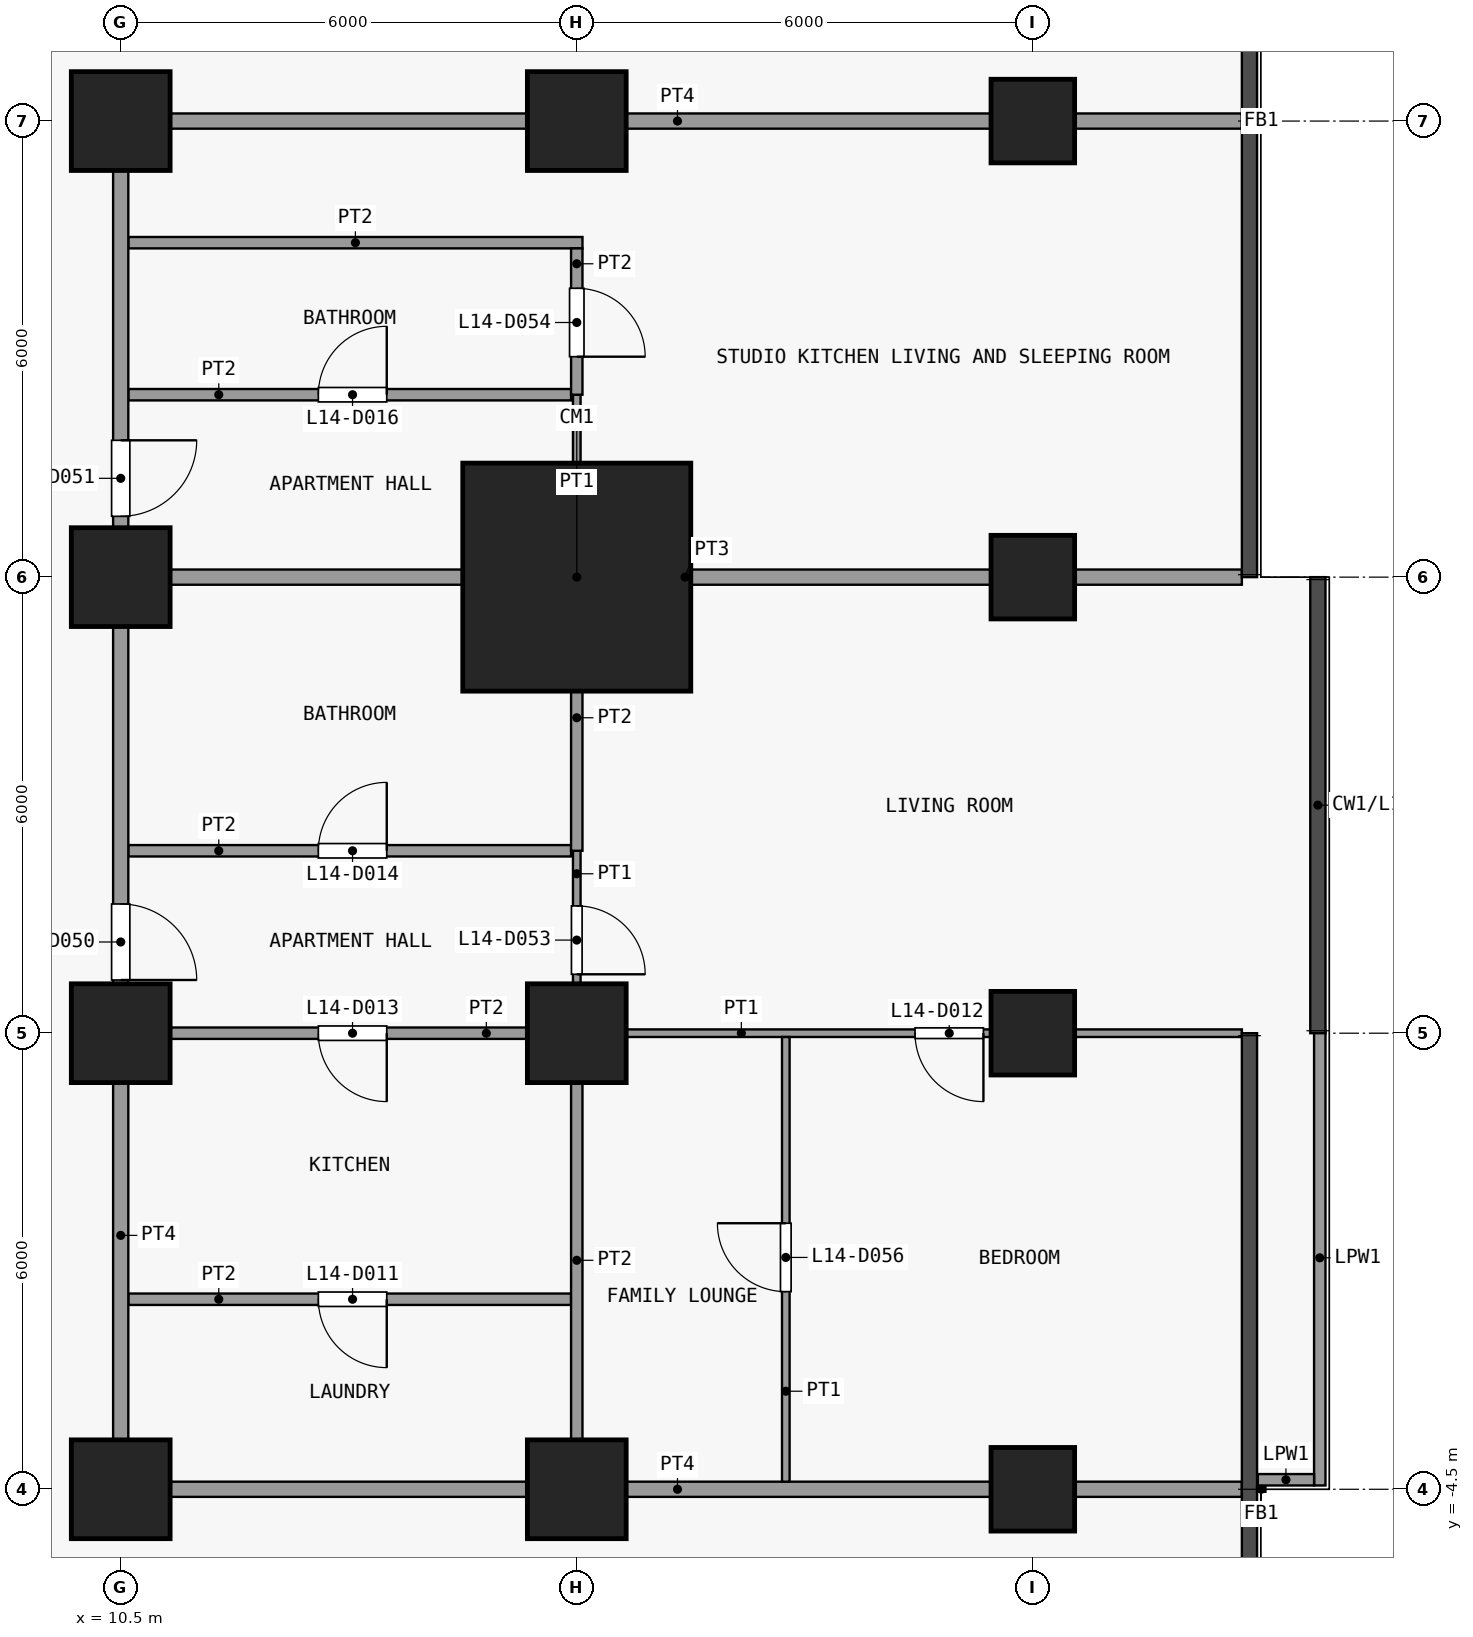
"""IFC4 building model, lengths in metres.
Left out: names, types, materials, properties, quantities, classifications, styles, units other than length and angle.
Written with IfcOpenShell. Run it as: python <this file> out.ifc"""

import sys

from ifc_helpers import new_model, si_unit, direction, frame, frame_2d, origin, origin_2d, place, context, subcontext, project, spatial, rectangle, extrude, element, fill, save


model = new_model("IFC4")
c1 = context("Model", 3, precision=1e-05, world=origin(), true_north=direction((0.0, 1.0)))
c2 = subcontext(c1, "Body", "Model", "MODEL_VIEW")
j1 = project(units=[si_unit("LENGTHUNIT", "METRE"), si_unit("PLANEANGLEUNIT", "RADIAN")], contexts=[c1])
p1 = place(None, origin())
s1 = spatial("IfcSite", under=j1, at=p1, CompositionType="ELEMENT")
p2 = place(p1, origin())
s2 = spatial("IfcBuilding", under=s1, at=p2, CompositionType="ELEMENT")
p3 = place(p2, frame((0.0, 0.0, 61.3)))
s3 = spatial("IfcBuildingStorey", under=s2, at=p3, CompositionType="ELEMENT", Elevation=61.3)
for number, where, z_axis, x_axis in (
    (1, (10.5, -4.5, 0.0), (0.0, 0.0, 1.0), (1.0, 0.0, 0.0)),
    (2, (10.5, 1.5, 0.0), (0.0, 0.0, 1.0), (1.0, 0.0, 0.0)),
    (3, (10.5, 7.5, 0.0), (0.0, 0.0, 1.0), (1.0, 0.0, 0.0)),
    (4, (10.5, 13.5, 0.0), (0.0, 0.0, 1.0), (1.0, 0.0, 0.0)),
    (5, (16.5, -4.5, 0.0), (0.0, 0.0, 1.0), (1.0, 0.0, 0.0)),
    (6, (16.5, 1.5, 0.0), (0.0, 0.0, 1.0), (1.0, 0.0, 0.0)),
):
    element("IfcColumn", number, at=place(p3, frame(where, z_axis=z_axis, x_axis=x_axis)), inside=s3, PredefinedType="COLUMN", context=c2, shape_type="SweptSolid", body=[
        extrude(rectangle(XDim=1.3, YDim=1.3, at=origin_2d()), origin(), (0.0, 0.0, 1.0), 3.6),
    ])
p4 = place(p3, frame((16.5, 7.5, 0.0), z_axis=(0.0, 0.0, 1.0), x_axis=(1.0, 0.0, 0.0)))
e7 = element("IfcColumn", 7, at=p4, inside=s3, PredefinedType="COLUMN", context=c2, shape_type="SweptSolid", body=[
    extrude(rectangle(XDim=3.0, YDim=3.0, at=origin_2d()), origin(), (0.0, 0.0, 1.0), 3.6),
])
p5 = place(p3, frame((16.5, 13.5, 0.0), z_axis=(0.0, 0.0, 1.0), x_axis=(1.0, 0.0, 0.0)))
e8 = element("IfcColumn", 8, at=p5, inside=s3, PredefinedType="COLUMN", context=c2, shape_type="SweptSolid", body=[
    extrude(rectangle(XDim=1.3, YDim=1.3, at=origin_2d()), origin(), (0.0, 0.0, 1.0), 3.6),
])
for number, where, z_axis, x_axis in (
    (9, (22.5, -4.5, 0.0), (0.0, 0.0, 1.0), (1.0, 0.0, 0.0)),
    (10, (22.5, 1.5, 0.0), (0.0, 0.0, 1.0), (1.0, 0.0, 0.0)),
    (11, (22.5, 7.5, 0.0), (0.0, 0.0, 1.0), (1.0, 0.0, 0.0)),
    (12, (22.5, 13.5, 0.0), (0.0, 0.0, 1.0), (1.0, 0.0, 0.0)),
):
    element("IfcColumn", number, at=place(p3, frame(where, z_axis=z_axis, x_axis=x_axis)), inside=s3, PredefinedType="COLUMN", context=c2, shape_type="SweptSolid", body=[
        extrude(rectangle(XDim=1.1, YDim=1.1, at=origin_2d()), origin(), (0.0, 0.0, 1.0), 3.6),
    ])
p6 = place(p3, frame((26.275, 1.54, 0.0), z_axis=(0.0, 0.0, 1.0), x_axis=(0.0, -1.0, 0.0)))
e13 = element("IfcWall", 13, at=p6, inside=s3, PredefinedType="PARAPET", context=c2, shape_type="SweptSolid", body=[
    extrude(rectangle(XDim=5.99, YDim=0.15, at=frame_2d((2.995, 0.0))), origin(), (0.0, 0.0, 1.0), 1.15),
])
p7 = place(p3, frame((26.2, -4.375, 0.0), z_axis=(0.0, 0.0, 1.0), x_axis=(-1.0, 0.0, 0.0)))
e14 = element("IfcWall", 14, at=p7, inside=s3, PredefinedType="PARAPET", context=c2, shape_type="SweptSolid", body=[
    extrude(rectangle(XDim=0.74, YDim=0.15, at=frame_2d((0.37, 0.0))), origin(), (0.0, 0.0, 1.0), 1.15),
])
p8 = place(p3, frame((10.4, -4.5, 0.0), z_axis=(0.0, 0.0, 1.0), x_axis=(1.0, 0.0, 0.0)))
e15 = element("IfcWall", 15, at=p8, inside=s3, PredefinedType="PARTITIONING", context=c2, shape_type="SweptSolid", body=[
    extrude(rectangle(XDim=14.85, YDim=0.2, at=frame_2d((7.425, 0.0))), origin(), (0.0, 0.0, 1.0), 3.3),
])
p9 = place(p3, frame((10.6, -2.0, 0.0), z_axis=(0.0, 0.0, 1.0), x_axis=(1.0, 0.0, 0.0)))
e16 = element("IfcWall", 16, at=p9, inside=s3, PredefinedType="PARTITIONING", context=c2, shape_type="SweptSolid", body=[
    extrude(rectangle(XDim=5.825, YDim=0.15, at=frame_2d((2.913, 0.0))), origin(), (0.0, 0.0, 1.0), 3.3),
])
p10 = place(p9, frame((2.5, 0.0, 0.0)))
e17 = element("IfcOpeningElement", 17, at=p10, cuts=e16, PredefinedType="OPENING", context=c2, shape_type="SweptSolid", body=[
    extrude(rectangle(XDim=0.9, YDim=2.1, at=frame_2d((0.45, 1.05))), frame((0.0, 0.085, 0.0), z_axis=(0.0, -1.0, 0.0), x_axis=(1.0, 0.0, 0.0)), (0.0, 0.0, 1.0), 0.17),
])
p11 = place(p3, frame((16.5, 1.5, 0.0), z_axis=(0.0, 0.0, 1.0), x_axis=(1.0, 0.0, 0.0)))
e18 = element("IfcWall", 18, at=p11, inside=s3, PredefinedType="PARTITIONING", context=c2, shape_type="SweptSolid", body=[
    extrude(rectangle(XDim=8.75, YDim=0.1, at=frame_2d((4.375, 0.0))), origin(), (0.0, 0.0, 1.0), 3.3),
])
p12 = place(p11, frame((4.45, 0.0, 0.0)))
e19 = element("IfcOpeningElement", 19, at=p12, cuts=e18, PredefinedType="OPENING", context=c2, shape_type="SweptSolid", body=[
    extrude(rectangle(XDim=0.9, YDim=2.1, at=frame_2d((0.45, 1.05))), frame((0.0, 0.06, 0.0), z_axis=(0.0, -1.0, 0.0), x_axis=(1.0, 0.0, 0.0)), (0.0, 0.0, 1.0), 0.12),
])
p13 = place(p3, frame((10.6, 1.5, 0.0), z_axis=(0.0, 0.0, 1.0), x_axis=(1.0, 0.0, 0.0)))
e20 = element("IfcWall", 20, at=p13, inside=s3, PredefinedType="PARTITIONING", context=c2, shape_type="SweptSolid", body=[
    extrude(rectangle(XDim=5.9, YDim=0.15, at=frame_2d((2.95, 0.0))), origin(), (0.0, 0.0, 1.0), 3.3),
])
p14 = place(p13, frame((2.5, 0.0, 0.0)))
e21 = element("IfcOpeningElement", 21, at=p14, cuts=e20, PredefinedType="OPENING", context=c2, shape_type="SweptSolid", body=[
    extrude(rectangle(XDim=0.9, YDim=2.1, at=frame_2d((0.45, 1.05))), frame((0.0, 0.085, 0.0), z_axis=(0.0, -1.0, 0.0), x_axis=(1.0, 0.0, 0.0)), (0.0, 0.0, 1.0), 0.17),
])
p15 = place(p3, frame((10.6, 3.9, 0.0), z_axis=(0.0, 0.0, 1.0), x_axis=(1.0, 0.0, 0.0)))
e22 = element("IfcWall", 22, at=p15, inside=s3, PredefinedType="PARTITIONING", context=c2, shape_type="SweptSolid", body=[
    extrude(rectangle(XDim=5.825, YDim=0.15, at=frame_2d((2.913, 0.0))), origin(), (0.0, 0.0, 1.0), 3.3),
])
p16 = place(p15, frame((2.5, 0.0, 0.0)))
e23 = element("IfcOpeningElement", 23, at=p16, cuts=e22, PredefinedType="OPENING", context=c2, shape_type="SweptSolid", body=[
    extrude(rectangle(XDim=0.9, YDim=2.1, at=frame_2d((0.45, 1.05))), frame((0.0, 0.085, 0.0), z_axis=(0.0, -1.0, 0.0), x_axis=(1.0, 0.0, 0.0)), (0.0, 0.0, 1.0), 0.17),
])
p17 = place(p3, frame((10.6, 7.5, 0.0), z_axis=(0.0, 0.0, 1.0), x_axis=(1.0, 0.0, 0.0)))
e24 = element("IfcWall", 24, at=p17, inside=s3, PredefinedType="PARTITIONING", context=c2, shape_type="SweptSolid", body=[
    extrude(rectangle(XDim=14.65, YDim=0.2, at=frame_2d((7.325, 0.0))), origin(), (0.0, 0.0, 1.0), 3.3),
])
p18 = place(p3, frame((10.6, 9.9, 0.0), z_axis=(0.0, 0.0, 1.0), x_axis=(1.0, 0.0, 0.0)))
e25 = element("IfcWall", 25, at=p18, inside=s3, PredefinedType="PARTITIONING", context=c2, shape_type="SweptSolid", body=[
    extrude(rectangle(XDim=5.825, YDim=0.15, at=frame_2d((2.913, 0.0))), origin(), (0.0, 0.0, 1.0), 3.3),
])
p19 = place(p18, frame((2.5, 0.0, 0.0)))
e26 = element("IfcOpeningElement", 26, at=p19, cuts=e25, PredefinedType="OPENING", context=c2, shape_type="SweptSolid", body=[
    extrude(rectangle(XDim=0.9, YDim=2.1, at=frame_2d((0.45, 1.05))), frame((0.0, 0.085, 0.0), z_axis=(0.0, -1.0, 0.0), x_axis=(1.0, 0.0, 0.0)), (0.0, 0.0, 1.0), 0.17),
])
p20 = place(p3, frame((10.6, 11.9, 0.0), z_axis=(0.0, 0.0, 1.0), x_axis=(1.0, 0.0, 0.0)))
e27 = element("IfcWall", 27, at=p20, inside=s3, PredefinedType="PARTITIONING", context=c2, shape_type="SweptSolid", body=[
    extrude(rectangle(XDim=5.975, YDim=0.15, at=frame_2d((2.987, 0.0))), origin(), (0.0, 0.0, 1.0), 3.3),
])
p21 = place(p3, frame((10.4, 13.5, 0.0), z_axis=(0.0, 0.0, 1.0), x_axis=(1.0, 0.0, 0.0)))
e28 = element("IfcWall", 28, at=p21, inside=s3, PredefinedType="PARTITIONING", context=c2, shape_type="SweptSolid", body=[
    extrude(rectangle(XDim=14.85, YDim=0.2, at=frame_2d((7.425, 0.0))), origin(), (0.0, 0.0, 1.0), 3.3),
])
p22 = place(p3, frame((10.5, -4.4, 0.0), z_axis=(0.0, 0.0, 1.0), x_axis=(0.0, 1.0, 0.0)))
e29 = element("IfcWall", 29, at=p22, inside=s3, PredefinedType="PARTITIONING", context=c2, shape_type="SweptSolid", body=[
    extrude(rectangle(XDim=17.8, YDim=0.2, at=frame_2d((8.9, 0.0))), origin(), (0.0, 0.0, 1.0), 3.3),
])
p23 = place(p22, frame((6.6, 0.0, 0.0)))
e30 = element("IfcOpeningElement", 30, at=p23, cuts=e29, PredefinedType="OPENING", context=c2, shape_type="SweptSolid", body=[
    extrude(rectangle(XDim=1.0, YDim=2.1, at=frame_2d((0.5, 1.05))), frame((0.0, 0.11, 0.0), z_axis=(0.0, -1.0, 0.0), x_axis=(1.0, 0.0, 0.0)), (0.0, 0.0, 1.0), 0.22),
])
p24 = place(p22, frame((12.7, 0.0, 0.0)))
e31 = element("IfcOpeningElement", 31, at=p24, cuts=e29, PredefinedType="OPENING", context=c2, shape_type="SweptSolid", body=[
    extrude(rectangle(XDim=1.0, YDim=2.1, at=frame_2d((0.5, 1.05))), frame((0.0, 0.11, 0.0), z_axis=(0.0, -1.0, 0.0), x_axis=(1.0, 0.0, 0.0)), (0.0, 0.0, 1.0), 0.22),
])
p25 = place(p3, frame((16.5, 1.575, 0.0), z_axis=(0.0, 0.0, 1.0), x_axis=(0.0, 1.0, 0.0)))
e32 = element("IfcWall", 32, at=p25, inside=s3, PredefinedType="PARTITIONING", context=c2, shape_type="SweptSolid", body=[
    extrude(rectangle(XDim=2.325, YDim=0.1, at=frame_2d((1.163, 0.0))), origin(), (0.0, 0.0, 1.0), 3.3),
])
p26 = place(p25, frame((0.7, 0.0, 0.0)))
e33 = element("IfcOpeningElement", 33, at=p26, cuts=e32, PredefinedType="OPENING", context=c2, shape_type="SweptSolid", body=[
    extrude(rectangle(XDim=0.9, YDim=2.1, at=frame_2d((0.45, 1.05))), frame((0.0, 0.06, 0.0), z_axis=(0.0, -1.0, 0.0), x_axis=(1.0, 0.0, 0.0)), (0.0, 0.0, 1.0), 0.12),
])
p27 = place(p3, frame((16.5, 7.6, 0.0), z_axis=(0.0, 0.0, 1.0), x_axis=(0.0, 1.0, 0.0)))
e34 = element("IfcWall", 34, at=p27, inside=s3, PredefinedType="PARTITIONING", context=c2, shape_type="SweptSolid", body=[
    extrude(rectangle(XDim=2.3, YDim=0.1, at=frame_2d((1.15, 0.0))), origin(), (0.0, 0.0, 1.0), 3.3),
])
p28 = place(p3, frame((16.5, -4.4, 0.0), z_axis=(0.0, 0.0, 1.0), x_axis=(0.0, 1.0, 0.0)))
e35 = element("IfcWall", 35, at=p28, inside=s3, PredefinedType="PARTITIONING", context=c2, shape_type="SweptSolid", body=[
    extrude(rectangle(XDim=5.825, YDim=0.15, at=frame_2d((2.913, 0.0))), origin(), (0.0, 0.0, 1.0), 3.3),
])
p29 = place(p3, frame((16.5, 3.9, 0.0), z_axis=(0.0, 0.0, 1.0), x_axis=(0.0, 1.0, 0.0)))
e36 = element("IfcWall", 36, at=p29, inside=s3, PredefinedType="PARTITIONING", context=c2, shape_type="SweptSolid", body=[
    extrude(rectangle(XDim=3.5, YDim=0.15, at=frame_2d((1.75, 0.0))), origin(), (0.0, 0.0, 1.0), 3.3),
])
p30 = place(p3, frame((16.5, 9.9, 0.0), z_axis=(0.0, 0.0, 1.0), x_axis=(0.0, 1.0, 0.0)))
e37 = element("IfcWall", 37, at=p30, inside=s3, PredefinedType="PARTITIONING", context=c2, shape_type="SweptSolid", body=[
    extrude(rectangle(XDim=1.925, YDim=0.15, at=frame_2d((0.962, 0.0))), origin(), (0.0, 0.0, 1.0), 3.3),
])
p31 = place(p30, frame((0.5, 0.0, 0.0)))
e38 = element("IfcOpeningElement", 38, at=p31, cuts=e37, PredefinedType="OPENING", context=c2, shape_type="SweptSolid", body=[
    extrude(rectangle(XDim=0.9, YDim=2.1, at=frame_2d((0.45, 1.05))), frame((0.0, 0.085, 0.0), z_axis=(0.0, -1.0, 0.0), x_axis=(1.0, 0.0, 0.0)), (0.0, 0.0, 1.0), 0.17),
])
p32 = place(p3, frame((19.25, -4.4, 0.0), z_axis=(0.0, 0.0, 1.0), x_axis=(0.0, 1.0, 0.0)))
e39 = element("IfcWall", 39, at=p32, inside=s3, PredefinedType="PARTITIONING", context=c2, shape_type="SweptSolid", body=[
    extrude(rectangle(XDim=5.85, YDim=0.1, at=frame_2d((2.925, 0.0))), origin(), (0.0, 0.0, 1.0), 3.3),
])
p33 = place(p32, frame((2.5, 0.0, 0.0)))
e40 = element("IfcOpeningElement", 40, at=p33, cuts=e39, PredefinedType="OPENING", context=c2, shape_type="SweptSolid", body=[
    extrude(rectangle(XDim=0.9, YDim=2.1, at=frame_2d((0.45, 1.05))), frame((0.0, 0.06, 0.0), z_axis=(0.0, -1.0, 0.0), x_axis=(1.0, 0.0, 0.0)), (0.0, 0.0, 1.0), 0.12),
])
p34 = place(p10, origin())
e41 = element("IfcDoor", 41, at=p34, inside=s3, OperationType="SINGLE_SWING_RIGHT", PredefinedType="DOOR", context=c2, shape_type="SweptSolid", body=[
    extrude(rectangle(XDim=0.9, YDim=2.1, at=frame_2d((0.45, 1.05))), frame((0.0, 0.025, 0.0), z_axis=(0.0, -1.0, 0.0), x_axis=(1.0, 0.0, 0.0)), (0.0, 0.0, 1.0), 0.05),
])
fill(e17, e41)
p35 = place(p12, origin())
e42 = element("IfcDoor", 42, at=p35, inside=s3, OperationType="SINGLE_SWING_RIGHT", PredefinedType="DOOR", context=c2, shape_type="SweptSolid", body=[
    extrude(rectangle(XDim=0.9, YDim=2.1, at=frame_2d((0.45, 1.05))), frame((0.0, 0.025, 0.0), z_axis=(0.0, -1.0, 0.0), x_axis=(1.0, 0.0, 0.0)), (0.0, 0.0, 1.0), 0.05),
])
fill(e19, e42)
p36 = place(p14, origin())
e43 = element("IfcDoor", 43, at=p36, inside=s3, OperationType="SINGLE_SWING_RIGHT", PredefinedType="DOOR", context=c2, shape_type="SweptSolid", body=[
    extrude(rectangle(XDim=0.9, YDim=2.1, at=frame_2d((0.45, 1.05))), frame((0.0, 0.025, 0.0), z_axis=(0.0, -1.0, 0.0), x_axis=(1.0, 0.0, 0.0)), (0.0, 0.0, 1.0), 0.05),
])
fill(e21, e43)
p37 = place(p16, origin())
e44 = element("IfcDoor", 44, at=p37, inside=s3, OperationType="SINGLE_SWING_LEFT", PredefinedType="DOOR", context=c2, shape_type="SweptSolid", body=[
    extrude(rectangle(XDim=0.9, YDim=2.1, at=frame_2d((0.45, 1.05))), frame((0.0, 0.025, 0.0), z_axis=(0.0, -1.0, 0.0), x_axis=(1.0, 0.0, 0.0)), (0.0, 0.0, 1.0), 0.05),
])
fill(e23, e44)
p38 = place(p19, origin())
e45 = element("IfcDoor", 45, at=p38, inside=s3, OperationType="SINGLE_SWING_LEFT", PredefinedType="DOOR", context=c2, shape_type="SweptSolid", body=[
    extrude(rectangle(XDim=0.9, YDim=2.1, at=frame_2d((0.45, 1.05))), frame((0.0, 0.025, 0.0), z_axis=(0.0, -1.0, 0.0), x_axis=(1.0, 0.0, 0.0)), (0.0, 0.0, 1.0), 0.05),
])
fill(e26, e45)
p39 = place(p23, origin())
e46 = element("IfcDoor", 46, at=p39, inside=s3, OperationType="SINGLE_SWING_LEFT", PredefinedType="DOOR", context=c2, shape_type="SweptSolid", body=[
    extrude(rectangle(XDim=1.0, YDim=2.1, at=frame_2d((0.5, 1.05))), frame((0.0, 0.025, 0.0), z_axis=(0.0, -1.0, 0.0), x_axis=(1.0, 0.0, 0.0)), (0.0, 0.0, 1.0), 0.05),
])
fill(e30, e46)
p40 = place(p24, origin())
e47 = element("IfcDoor", 47, at=p40, inside=s3, OperationType="SINGLE_SWING_RIGHT", PredefinedType="DOOR", context=c2, shape_type="SweptSolid", body=[
    extrude(rectangle(XDim=1.0, YDim=2.1, at=frame_2d((0.5, 1.05))), frame((0.0, 0.025, 0.0), z_axis=(0.0, -1.0, 0.0), x_axis=(1.0, 0.0, 0.0)), (0.0, 0.0, 1.0), 0.05),
])
fill(e31, e47)
p41 = place(p26, origin())
e48 = element("IfcDoor", 48, at=p41, inside=s3, OperationType="SINGLE_SWING_LEFT", PredefinedType="DOOR", context=c2, shape_type="SweptSolid", body=[
    extrude(rectangle(XDim=0.9, YDim=2.1, at=frame_2d((0.45, 1.05))), frame((0.0, 0.025, 0.0), z_axis=(0.0, -1.0, 0.0), x_axis=(1.0, 0.0, 0.0)), (0.0, 0.0, 1.0), 0.05),
])
fill(e33, e48)
p42 = place(p31, origin())
e49 = element("IfcDoor", 49, at=p42, inside=s3, OperationType="SINGLE_SWING_LEFT", PredefinedType="DOOR", context=c2, shape_type="SweptSolid", body=[
    extrude(rectangle(XDim=0.9, YDim=2.1, at=frame_2d((0.45, 1.05))), frame((0.0, 0.025, 0.0), z_axis=(0.0, -1.0, 0.0), x_axis=(1.0, 0.0, 0.0)), (0.0, 0.0, 1.0), 0.05),
])
fill(e38, e49)
p43 = place(p33, origin())
e50 = element("IfcDoor", 50, at=p43, inside=s3, OperationType="SINGLE_SWING_LEFT", PredefinedType="DOOR", context=c2, shape_type="SweptSolid", body=[
    extrude(rectangle(XDim=0.9, YDim=2.1, at=frame_2d((0.45, 1.05))), frame((0.0, 0.025, 0.0), z_axis=(0.0, -1.0, 0.0), x_axis=(1.0, 0.0, 0.0)), (0.0, 0.0, 1.0), 0.05),
])
fill(e40, e50)
save(model, sys.argv[1])
